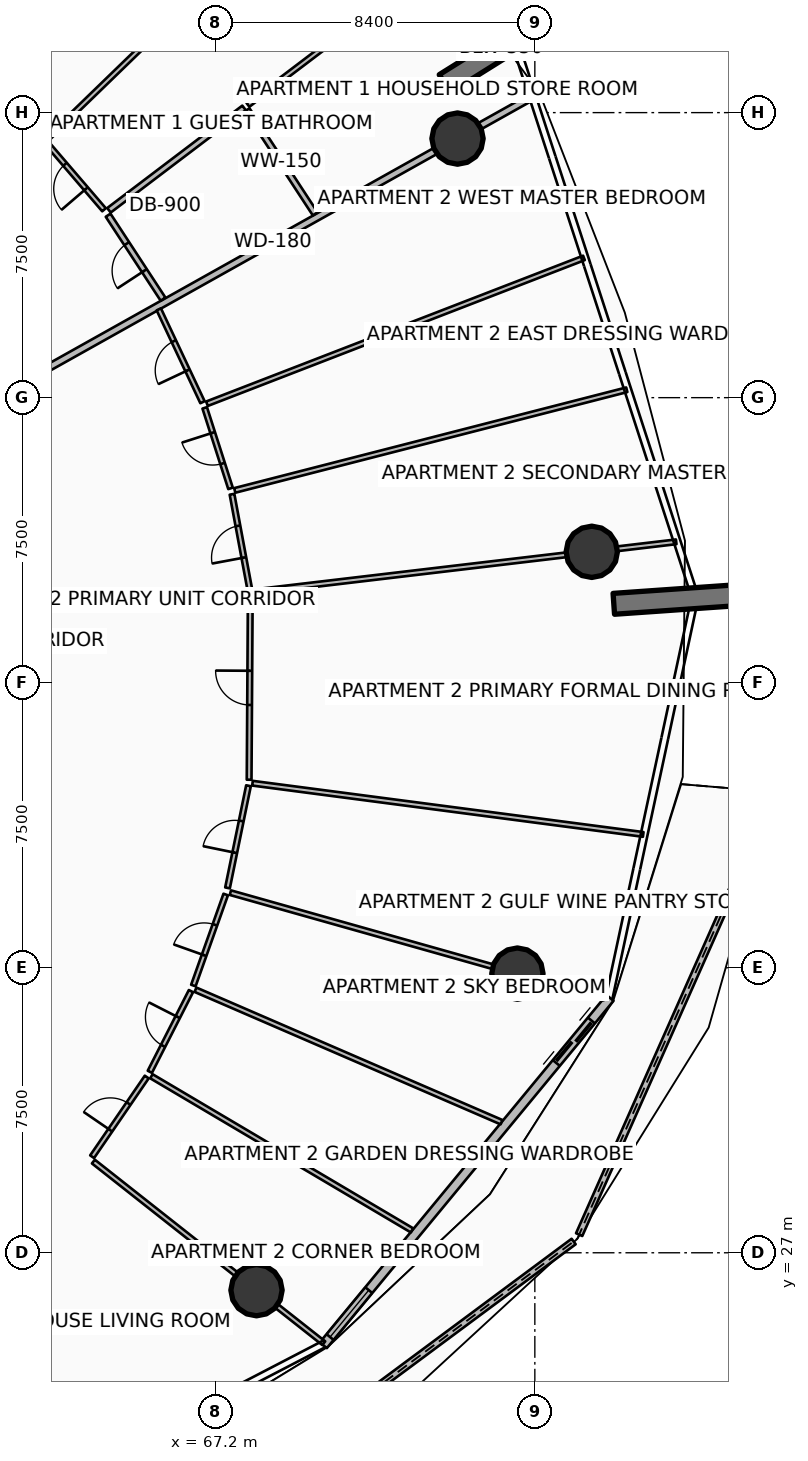
"""IFC4 building model, lengths in metres.
Left out: names, types, materials, properties, quantities, classifications, styles, units other than length and angle.
Written with IfcOpenShell. Run it as: python <this file> out.ifc"""

import sys

from ifc_helpers import new_model, si_unit, direction, frame, frame_2d, origin, origin_2d, place, context, subcontext, project, spatial, polyline, rectangle, circle, outline, extrude, element, fill, save


model = new_model("IFC4")
c1 = context("Model", 3, precision=1e-05, world=origin(), true_north=direction((0.0, 1.0)))
c2 = subcontext(c1, "Body", "Model", "MODEL_VIEW")
j1 = project(units=[si_unit("LENGTHUNIT", "METRE"), si_unit("PLANEANGLEUNIT", "RADIAN")], contexts=[c1])
p1 = place(None, origin())
s1 = spatial("IfcSite", under=j1, at=p1, CompositionType="ELEMENT")
p2 = place(p1, origin())
s2 = spatial("IfcBuilding", under=s1, at=p2, CompositionType="ELEMENT")
p3 = place(p2, frame((0.0, 0.0, 30.15)))
s3 = spatial("IfcBuildingStorey", under=s2, at=p3, CompositionType="ELEMENT", Elevation=30.15)
for number, where, z_axis, x_axis in (
    (1, (73.23, 57.765, 0.0), (0.0, 0.0, 1.0), (0.848, 0.53, 0.0)),
    (2, (77.678, 44.075, 0.0), (0.0, 0.0, 1.0), (0.998, 0.07, 0.0)),
):
    element("IfcWall", number, at=place(p3, frame(where, z_axis=z_axis, x_axis=x_axis)), inside=s3, PredefinedType="SOLIDWALL", context=c2, shape_type="SweptSolid", body=[
        extrude(rectangle(XDim=3.5, YDim=0.55, at=frame_2d((1.75, 0.0))), origin(), (0.0, 0.0, 1.0), 3.75),
    ])
for number, where, z_axis, x_axis in (
    (3, (73.565, 56.317, 0.0), (0.0, 0.0, 1.0), (1.0, 0.0, 0.0)),
    (4, (68.276, 26.016, 0.0), (0.0, 0.0, 1.0), (1.0, 0.0, 0.0)),
    (5, (75.141, 34.345, 0.0), (0.0, 0.0, 1.0), (1.0, 0.0, 0.0)),
    (6, (77.098, 45.444, 0.0), (0.0, 0.0, 1.0), (1.0, 0.0, 0.0)),
):
    element("IfcColumn", number, at=place(p3, frame(where, z_axis=z_axis, x_axis=x_axis)), inside=s3, PredefinedType="COLUMN", context=c2, shape_type="SweptSolid", body=[
        extrude(circle(Radius=0.675, at=origin_2d()), origin(), (0.0, 0.0, 1.0), 3.5),
    ])
p4 = place(p3, frame((66.933, 20.104, 0.0), z_axis=(0.0, 0.0, 1.0), x_axis=(0.802947764501, 0.596049400204, 0.0)))
e7 = element("IfcWall", 7, at=p4, inside=s3, PredefinedType="PARAPET", context=c2, shape_type="SweptSolid", body=[
    extrude(outline(polyline([(0.0, 0.0), (12.065, 0.0), (12.066, 1.832), (6.033, 1.696), (0.0, 1.497), (0.0, 0.0)])), frame((0.0, 0.09, 0.0), z_axis=(0.0, -1.0, 0.0), x_axis=(1.0, 0.0, 0.0)), (0.0, 0.0, 1.0), 0.18),
])
p5 = place(p3, frame((76.766, 27.477, 0.0), z_axis=(0.0, 0.0, 1.0), x_axis=(0.405953542593, 0.91389371442, 0.0)))
e8 = element("IfcWall", 8, at=p5, inside=s3, PredefinedType="PARAPET", context=c2, shape_type="SweptSolid", body=[
    extrude(outline(polyline([(0.0, 0.0), (12.74, 0.0), (12.74, 1.756), (6.37, 1.853), (0.0, 1.832), (0.0, 0.0)])), frame((0.0, 0.09, 0.0), z_axis=(0.0, -1.0, 0.0), x_axis=(1.0, 0.0, 0.0)), (0.0, 0.0, 1.0), 0.18),
])
p6 = place(p3, frame((70.033, 24.567, 0.0), z_axis=(0.0, 0.0, 1.0), x_axis=(0.636674332663, 0.771132799281, 0.0)))
e9 = element("IfcWall", 9, at=p6, inside=s3, PredefinedType="SOLIDWALL", context=c2, shape_type="SweptSolid", body=[
    extrude(rectangle(XDim=11.851, YDim=0.24, at=frame_2d((5.926, 0.0))), origin(), (0.0, 0.0, 1.0), 2.45),
])
p7 = place(p6, frame((9.631, 0.0, 0.0)))
e10 = element("IfcOpeningElement", 10, at=p7, cuts=e9, PredefinedType="OPENING", context=c2, shape_type="SweptSolid", body=[
    extrude(rectangle(XDim=1.45, YDim=2.15, at=frame_2d((0.725, 1.075))), frame((0.0, 0.13, 0.0), z_axis=(0.0, -1.0, 0.0), x_axis=(1.0, 0.0, 0.0)), (0.0, 0.0, 1.0), 0.26),
])
p8 = place(p6, frame((0.28, 0.0, 0.65)))
e11 = element("IfcOpeningElement", 11, at=p8, cuts=e9, PredefinedType="OPENING", context=c2, shape_type="SweptSolid", body=[
    extrude(rectangle(XDim=1.6, YDim=1.5, at=frame_2d((0.8, 0.75))), frame((0.0, 0.13, 0.0), z_axis=(0.0, -1.0, 0.0), x_axis=(1.0, 0.0, 0.0)), (0.0, 0.0, 1.0), 0.26),
])
p9 = place(p3, frame((61.896, 49.782, 0.0), z_axis=(0.0, 0.0, 1.0), x_axis=(0.872493215695, 0.488626225828, 0.0)))
e12 = element("IfcWall", 12, at=p9, inside=s3, PredefinedType="PARTITIONING", context=c2, shape_type="SweptSolid", body=[
    extrude(rectangle(XDim=15.612, YDim=0.18, at=frame_2d((7.806, 0.0))), origin(), (0.0, 0.0, 1.0), 2.867),
])
p10 = place(p3, frame((65.816, 52.092, 0.0), z_axis=(0.0, 0.0, 1.0), x_axis=(-0.547635625156, 0.836716930664, 0.0)))
e13 = element("IfcWall", 13, at=p10, inside=s3, PredefinedType="PARTITIONING", context=c2, shape_type="SweptSolid", body=[
    extrude(rectangle(XDim=2.639, YDim=0.15, at=frame_2d((1.32, 0.0))), origin(), (0.0, 0.0, 1.0), 2.867),
])
p11 = place(p10, frame((0.895, 0.0, 0.0)))
e14 = element("IfcOpeningElement", 14, at=p11, cuts=e13, PredefinedType="OPENING", context=c2, shape_type="SweptSolid", body=[
    extrude(rectangle(XDim=0.85, YDim=2.06, at=frame_2d((0.425, 1.03))), frame((0.0, 0.085, 0.0), z_axis=(0.0, -1.0, 0.0), x_axis=(1.0, 0.0, 0.0)), (0.0, 0.0, 1.0), 0.17),
])
p12 = place(p3, frame((69.821, 54.335, 0.0), z_axis=(0.0, 0.0, 1.0), x_axis=(-0.547709492592, 0.836668579382, 0.0)))
e15 = element("IfcWall", 15, at=p12, inside=s3, PredefinedType="PARTITIONING", context=c2, shape_type="SweptSolid", body=[
    extrude(rectangle(XDim=3.273, YDim=0.15, at=frame_2d((1.637, 0.0))), origin(), (0.0, 0.0, 1.0), 2.867),
])
p13 = place(p3, frame((64.394, 54.43, 0.0), z_axis=(0.0, 0.0, 1.0), x_axis=(0.796855751732, 0.604169604442, 0.0)))
e16 = element("IfcWall", 16, at=p13, inside=s3, PredefinedType="PARTITIONING", context=c2, shape_type="SweptSolid", body=[
    extrude(rectangle(XDim=4.46, YDim=0.15, at=frame_2d((2.23, 0.0))), origin(), (0.0, 0.0, 1.0), 2.94),
])
p14 = place(p3, frame((68.051, 57.203, 0.0), z_axis=(0.0, 0.0, 1.0), x_axis=(0.796847589026, 0.604180370307, 0.0)))
e17 = element("IfcWall", 17, at=p14, inside=s3, PredefinedType="PARTITIONING", context=c2, shape_type="SweptSolid", body=[
    extrude(rectangle(XDim=6.015, YDim=0.125, at=frame_2d((3.008, 0.0))), origin(), (0.0, 0.0, 1.0), 2.94),
])
p15 = place(p14, frame((2.583, 0.0, 0.0)))
e18 = element("IfcOpeningElement", 18, at=p15, cuts=e17, PredefinedType="OPENING", context=c2, shape_type="SweptSolid", body=[
    extrude(rectangle(XDim=0.85, YDim=2.06, at=frame_2d((0.425, 1.03))), frame((0.0, 0.073, 0.0), z_axis=(0.0, -1.0, 0.0), x_axis=(1.0, 0.0, 0.0)), (0.0, 0.0, 1.0), 0.145),
])
p16 = place(p3, frame((62.775, 56.316, 0.0), z_axis=(0.0, 0.0, 1.0), x_axis=(0.718182919159, 0.695854363088, 0.0)))
e19 = element("IfcWall", 19, at=p16, inside=s3, PredefinedType="PARTITIONING", context=c2, shape_type="SweptSolid", body=[
    extrude(rectangle(XDim=10.114, YDim=0.125, at=frame_2d((5.057, 0.0))), origin(), (0.0, 0.0, 1.0), 2.94),
])
p17 = place(p3, frame((64.263, 54.444, 0.0), z_axis=(0.0, 0.0, 1.0), x_axis=(-0.651227570151, 0.758882502022, 0.0)))
e20 = element("IfcWall", 20, at=p17, inside=s3, PredefinedType="PARTITIONING", context=c2, shape_type="SweptSolid", body=[
    extrude(rectangle(XDim=2.304, YDim=0.125, at=frame_2d((1.152, 0.0))), origin(), (0.0, 0.0, 1.0), 2.94),
])
p18 = place(p17, frame((0.727, 0.0, 0.0)))
e21 = element("IfcOpeningElement", 21, at=p18, cuts=e20, PredefinedType="OPENING", context=c2, shape_type="SweptSolid", body=[
    extrude(rectangle(XDim=0.85, YDim=2.06, at=frame_2d((0.425, 1.03))), frame((0.0, 0.073, 0.0), z_axis=(0.0, -1.0, 0.0), x_axis=(1.0, 0.0, 0.0)), (0.0, 0.0, 1.0), 0.145),
])
p19 = place(p3, frame((60.743, 58.164, 0.0), z_axis=(0.0, 0.0, 1.0), x_axis=(0.61907620874, 0.785330916093, 0.0)))
e22 = element("IfcWall", 22, at=p19, inside=s3, PredefinedType="PARTITIONING", context=c2, shape_type="SweptSolid", body=[
    extrude(rectangle(XDim=10.091, YDim=0.125, at=frame_2d((5.046, 0.0))), origin(), (0.0, 0.0, 1.0), 2.867),
])
p20 = place(p3, frame((63.983, 29.4, 0.0), z_axis=(0.0, 0.0, 1.0), x_axis=(0.785322984339, -0.619086270457, 0.0)))
e23 = element("IfcWall", 23, at=p20, inside=s3, PredefinedType="PARTITIONING", context=c2, shape_type="SweptSolid", body=[
    extrude(rectangle(XDim=7.719, YDim=0.125, at=frame_2d((3.86, 0.0))), origin(), (0.0, 0.0, 1.0), 2.867),
])
p21 = place(p3, frame((65.51, 31.645, 0.0), z_axis=(0.0, 0.0, 1.0), x_axis=(0.86074163886, -0.509042072065, 0.0)))
e24 = element("IfcWall", 24, at=p21, inside=s3, PredefinedType="PARTITIONING", context=c2, shape_type="SweptSolid", body=[
    extrude(rectangle(XDim=7.968, YDim=0.125, at=frame_2d((3.984, 0.0))), origin(), (0.0, 0.0, 1.0), 2.94),
])
p22 = place(p3, frame((66.67, 33.921, 0.0), z_axis=(0.0, 0.0, 1.0), x_axis=(0.917747697885, -0.397163899451, 0.0)))
e25 = element("IfcWall", 25, at=p22, inside=s3, PredefinedType="PARTITIONING", context=c2, shape_type="SweptSolid", body=[
    extrude(rectangle(XDim=8.775, YDim=0.125, at=frame_2d((4.387, 0.0))), origin(), (0.0, 0.0, 1.0), 2.94),
])
p23 = place(p3, frame((63.95, 29.528, 0.0), z_axis=(0.0, 0.0, 1.0), x_axis=(0.565358509176, 0.824845292223, 0.0)))
e26 = element("IfcWall", 26, at=p23, inside=s3, PredefinedType="PARTITIONING", context=c2, shape_type="SweptSolid", body=[
    extrude(rectangle(XDim=2.542, YDim=0.125, at=frame_2d((1.271, 0.0))), origin(), (0.0, 0.0, 1.0), 2.867),
])
p24 = place(p23, frame((0.846, 0.0, 0.0)))
e27 = element("IfcOpeningElement", 27, at=p24, cuts=e26, PredefinedType="OPENING", context=c2, shape_type="SweptSolid", body=[
    extrude(rectangle(XDim=0.85, YDim=2.06, at=frame_2d((0.425, 1.03))), frame((0.0, 0.073, 0.0), z_axis=(0.0, -1.0, 0.0), x_axis=(1.0, 0.0, 0.0)), (0.0, 0.0, 1.0), 0.145),
])
p25 = place(p3, frame((65.469, 31.762, 0.0), z_axis=(0.0, 0.0, 1.0), x_axis=(0.45400250644, 0.891000406367, 0.0)))
e28 = element("IfcWall", 28, at=p25, inside=s3, PredefinedType="PARTITIONING", context=c2, shape_type="SweptSolid", body=[
    extrude(rectangle(XDim=2.383, YDim=0.125, at=frame_2d((1.192, 0.0))), origin(), (0.0, 0.0, 1.0), 2.94),
])
p26 = place(p25, frame((0.767, 0.0, 0.0)))
e29 = element("IfcOpeningElement", 29, at=p26, cuts=e28, PredefinedType="OPENING", context=c2, shape_type="SweptSolid", body=[
    extrude(rectangle(XDim=0.85, YDim=2.06, at=frame_2d((0.425, 1.03))), frame((0.0, 0.073, 0.0), z_axis=(0.0, -1.0, 0.0), x_axis=(1.0, 0.0, 0.0)), (0.0, 0.0, 1.0), 0.145),
])
p27 = place(p3, frame((66.614, 34.032, 0.0), z_axis=(0.0, 0.0, 1.0), x_axis=(0.335094930465, 0.942184370268, 0.0)))
e30 = element("IfcWall", 30, at=p27, inside=s3, PredefinedType="PARTITIONING", context=c2, shape_type="SweptSolid", body=[
    extrude(rectangle(XDim=2.542, YDim=0.125, at=frame_2d((1.271, 0.0))), origin(), (0.0, 0.0, 1.0), 2.867),
])
p28 = place(p27, frame((0.846, 0.0, 0.0)))
e31 = element("IfcOpeningElement", 31, at=p28, cuts=e30, PredefinedType="OPENING", context=c2, shape_type="SweptSolid", body=[
    extrude(rectangle(XDim=0.85, YDim=2.06, at=frame_2d((0.425, 1.03))), frame((0.0, 0.073, 0.0), z_axis=(0.0, -1.0, 0.0), x_axis=(1.0, 0.0, 0.0)), (0.0, 0.0, 1.0), 0.145),
])
p29 = place(p3, frame((67.589, 36.475, 0.0), z_axis=(0.0, 0.0, 1.0), x_axis=(0.962457516126, -0.271432366627, 0.0)))
e32 = element("IfcWall", 32, at=p29, inside=s3, PredefinedType="PARTITIONING", context=c2, shape_type="SweptSolid", body=[
    extrude(rectangle(XDim=10.221, YDim=0.125, at=frame_2d((5.111, 0.0))), origin(), (0.0, 0.0, 1.0), 2.867),
])
p30 = place(p3, frame((68.17, 39.355, 0.0), z_axis=(0.0, 0.0, 1.0), x_axis=(0.991512615626, -0.130010511326, 0.0)))
e33 = element("IfcWall", 33, at=p30, inside=s3, PredefinedType="PARTITIONING", context=c2, shape_type="SweptSolid", body=[
    extrude(rectangle(XDim=10.369, YDim=0.125, at=frame_2d((5.185, 0.0))), origin(), (0.0, 0.0, 1.0), 2.94),
])
p31 = place(p3, frame((67.513, 36.601, 0.0), z_axis=(0.0, 0.0, 1.0), x_axis=(0.201246233374, 0.979540684991, 0.0)))
e34 = element("IfcWall", 34, at=p31, inside=s3, PredefinedType="PARTITIONING", context=c2, shape_type="SweptSolid", body=[
    extrude(rectangle(XDim=2.744, YDim=0.125, at=frame_2d((1.372, 0.0))), origin(), (0.0, 0.0, 1.0), 2.867),
])
p32 = place(p31, frame((0.947, 0.0, 0.0)))
e35 = element("IfcOpeningElement", 35, at=p32, cuts=e34, PredefinedType="OPENING", context=c2, shape_type="SweptSolid", body=[
    extrude(rectangle(XDim=0.85, YDim=2.06, at=frame_2d((0.425, 1.03))), frame((0.0, 0.073, 0.0), z_axis=(0.0, -1.0, 0.0), x_axis=(1.0, 0.0, 0.0)), (0.0, 0.0, 1.0), 0.145),
])
p33 = place(p3, frame((68.082, 39.447, 0.0), z_axis=(0.0, 0.0, 1.0), x_axis=(0.006313643226, 0.999980068756, 0.0)))
e36 = element("IfcWall", 36, at=p33, inside=s3, PredefinedType="PARTITIONING", context=c2, shape_type="SweptSolid", body=[
    extrude(rectangle(XDim=4.833, YDim=0.125, at=frame_2d((2.417, 0.0))), origin(), (0.0, 0.0, 1.0), 2.867),
])
p34 = place(p33, frame((1.967, 0.0, 0.0)))
e37 = element("IfcOpeningElement", 37, at=p34, cuts=e36, PredefinedType="OPENING", context=c2, shape_type="SweptSolid", body=[
    extrude(rectangle(XDim=0.9, YDim=2.08, at=frame_2d((0.45, 1.04))), frame((0.0, 0.073, 0.0), z_axis=(0.0, -1.0, 0.0), x_axis=(1.0, 0.0, 0.0)), (0.0, 0.0, 1.0), 0.145),
])
p35 = place(p3, frame((68.212, 44.392, 0.0), z_axis=(0.0, 0.0, 1.0), x_axis=(0.993068868454, 0.117533920671, 0.0)))
e38 = element("IfcWall", 38, at=p35, inside=s3, PredefinedType="PARTITIONING", context=c2, shape_type="SweptSolid", body=[
    extrude(rectangle(XDim=11.186, YDim=0.125, at=frame_2d((5.593, 0.0))), origin(), (0.0, 0.0, 1.0), 2.867),
])
p36 = place(p3, frame((67.704, 47.059, 0.0), z_axis=(0.0, 0.0, 1.0), x_axis=(0.968581650893, 0.248695769071, 0.0)))
e39 = element("IfcWall", 39, at=p36, inside=s3, PredefinedType="PARTITIONING", context=c2, shape_type="SweptSolid", body=[
    extrude(rectangle(XDim=10.65, YDim=0.125, at=frame_2d((5.325, 0.0))), origin(), (0.0, 0.0, 1.0), 2.94),
])
p37 = place(p3, frame((66.973, 49.34, 0.0), z_axis=(0.0, 0.0, 1.0), x_axis=(0.93264336061, 0.360799614621, 0.0)))
e40 = element("IfcWall", 40, at=p37, inside=s3, PredefinedType="PARTITIONING", context=c2, shape_type="SweptSolid", body=[
    extrude(rectangle(XDim=10.636, YDim=0.125, at=frame_2d((5.318, 0.0))), origin(), (0.0, 0.0, 1.0), 2.94),
])
p38 = place(p3, frame((68.098, 44.459, 0.0), z_axis=(0.0, 0.0, 1.0), x_axis=(-0.183523097457, 0.983015397997, 0.0)))
e41 = element("IfcWall", 41, at=p38, inside=s3, PredefinedType="PARTITIONING", context=c2, shape_type="SweptSolid", body=[
    extrude(rectangle(XDim=2.542, YDim=0.125, at=frame_2d((1.271, 0.0))), origin(), (0.0, 0.0, 1.0), 2.867),
])
p39 = place(p38, frame((0.846, 0.0, 0.0)))
e42 = element("IfcOpeningElement", 42, at=p39, cuts=e41, PredefinedType="OPENING", context=c2, shape_type="SweptSolid", body=[
    extrude(rectangle(XDim=0.85, YDim=2.06, at=frame_2d((0.425, 1.03))), frame((0.0, 0.073, 0.0), z_axis=(0.0, -1.0, 0.0), x_axis=(1.0, 0.0, 0.0)), (0.0, 0.0, 1.0), 0.145),
])
p40 = place(p3, frame((67.592, 47.113, 0.0), z_axis=(0.0, 0.0, 1.0), x_axis=(-0.305309270218, 0.952253248626, 0.0)))
e43 = element("IfcWall", 43, at=p40, inside=s3, PredefinedType="PARTITIONING", context=c2, shape_type="SweptSolid", body=[
    extrude(rectangle(XDim=2.225, YDim=0.125, at=frame_2d((1.112, 0.0))), origin(), (0.0, 0.0, 1.0), 2.94),
])
p41 = place(p40, frame((0.687, 0.0, 0.0)))
e44 = element("IfcOpeningElement", 44, at=p41, cuts=e43, PredefinedType="OPENING", context=c2, shape_type="SweptSolid", body=[
    extrude(rectangle(XDim=0.85, YDim=2.06, at=frame_2d((0.425, 1.03))), frame((0.0, 0.073, 0.0), z_axis=(0.0, -1.0, 0.0), x_axis=(1.0, 0.0, 0.0)), (0.0, 0.0, 1.0), 0.145),
])
p42 = place(p3, frame((66.854, 49.38, 0.0), z_axis=(0.0, 0.0, 1.0), x_axis=(-0.425714313245, 0.904857626093, 0.0)))
e45 = element("IfcWall", 45, at=p42, inside=s3, PredefinedType="PARTITIONING", context=c2, shape_type="SweptSolid", body=[
    extrude(rectangle(XDim=2.7, YDim=0.125, at=frame_2d((1.35, 0.0))), origin(), (0.0, 0.0, 1.0), 2.867),
])
p43 = place(p42, frame((0.925, 0.0, 0.0)))
e46 = element("IfcOpeningElement", 46, at=p43, cuts=e45, PredefinedType="OPENING", context=c2, shape_type="SweptSolid", body=[
    extrude(rectangle(XDim=0.85, YDim=2.06, at=frame_2d((0.425, 1.03))), frame((0.0, 0.073, 0.0), z_axis=(0.0, -1.0, 0.0), x_axis=(1.0, 0.0, 0.0)), (0.0, 0.0, 1.0), 0.145),
])
p44 = place(p7, origin())
e47 = element("IfcDoor", 47, at=p44, inside=s3, OperationType="DOUBLE_DOOR_SLIDING", PredefinedType="DOOR", context=c2, shape_type="SweptSolid", body=[
    extrude(rectangle(XDim=1.45, YDim=2.15, at=frame_2d((0.725, 1.075))), frame((0.0, 0.025, 0.0), z_axis=(0.0, -1.0, 0.0), x_axis=(1.0, 0.0, 0.0)), (0.0, 0.0, 1.0), 0.05),
])
fill(e10, e47)
p45 = place(p8, origin())
e48 = element("IfcWindow", 48, at=p45, inside=s3, PartitioningType="SINGLE_PANEL", PredefinedType="WINDOW", context=c2, shape_type="SweptSolid", body=[
    extrude(rectangle(XDim=1.6, YDim=1.5, at=frame_2d((0.8, 0.75))), frame((0.0, 0.03, 0.0), z_axis=(0.0, -1.0, 0.0), x_axis=(1.0, 0.0, 0.0)), (0.0, 0.0, 1.0), 0.06),
])
fill(e11, e48)
p46 = place(p11, origin())
e49 = element("IfcDoor", 49, at=p46, inside=s3, OperationType="SINGLE_SWING_LEFT", PredefinedType="DOOR", context=c2, shape_type="SweptSolid", body=[
    extrude(rectangle(XDim=0.85, YDim=2.06, at=frame_2d((0.425, 1.03))), frame((0.0, 0.025, 0.0), z_axis=(0.0, -1.0, 0.0), x_axis=(1.0, 0.0, 0.0)), (0.0, 0.0, 1.0), 0.05),
])
fill(e14, e49)
p47 = place(p18, origin())
e50 = element("IfcDoor", 50, at=p47, inside=s3, OperationType="SINGLE_SWING_LEFT", PredefinedType="DOOR", context=c2, shape_type="SweptSolid", body=[
    extrude(rectangle(XDim=0.85, YDim=2.06, at=frame_2d((0.425, 1.03))), frame((0.0, 0.025, 0.0), z_axis=(0.0, -1.0, 0.0), x_axis=(1.0, 0.0, 0.0)), (0.0, 0.0, 1.0), 0.05),
])
fill(e21, e50)
p48 = place(p24, origin())
e51 = element("IfcDoor", 51, at=p48, inside=s3, OperationType="SINGLE_SWING_LEFT", PredefinedType="DOOR", context=c2, shape_type="SweptSolid", body=[
    extrude(rectangle(XDim=0.85, YDim=2.06, at=frame_2d((0.425, 1.03))), frame((0.0, 0.025, 0.0), z_axis=(0.0, -1.0, 0.0), x_axis=(1.0, 0.0, 0.0)), (0.0, 0.0, 1.0), 0.05),
])
fill(e27, e51)
p49 = place(p26, origin())
e52 = element("IfcDoor", 52, at=p49, inside=s3, OperationType="SINGLE_SWING_RIGHT", PredefinedType="DOOR", context=c2, shape_type="SweptSolid", body=[
    extrude(rectangle(XDim=0.85, YDim=2.06, at=frame_2d((0.425, 1.03))), frame((0.0, 0.025, 0.0), z_axis=(0.0, -1.0, 0.0), x_axis=(1.0, 0.0, 0.0)), (0.0, 0.0, 1.0), 0.05),
])
fill(e29, e52)
p50 = place(p28, origin())
e53 = element("IfcDoor", 53, at=p50, inside=s3, OperationType="SINGLE_SWING_LEFT", PredefinedType="DOOR", context=c2, shape_type="SweptSolid", body=[
    extrude(rectangle(XDim=0.85, YDim=2.06, at=frame_2d((0.425, 1.03))), frame((0.0, 0.025, 0.0), z_axis=(0.0, -1.0, 0.0), x_axis=(1.0, 0.0, 0.0)), (0.0, 0.0, 1.0), 0.05),
])
fill(e31, e53)
p51 = place(p32, origin())
e54 = element("IfcDoor", 54, at=p51, inside=s3, OperationType="SINGLE_SWING_LEFT", PredefinedType="DOOR", context=c2, shape_type="SweptSolid", body=[
    extrude(rectangle(XDim=0.85, YDim=2.06, at=frame_2d((0.425, 1.03))), frame((0.0, 0.025, 0.0), z_axis=(0.0, -1.0, 0.0), x_axis=(1.0, 0.0, 0.0)), (0.0, 0.0, 1.0), 0.05),
])
fill(e35, e54)
p52 = place(p34, origin())
e55 = element("IfcDoor", 55, at=p52, inside=s3, OperationType="SINGLE_SWING_RIGHT", PredefinedType="DOOR", context=c2, shape_type="SweptSolid", body=[
    extrude(rectangle(XDim=0.9, YDim=2.08, at=frame_2d((0.45, 1.04))), frame((0.0, 0.025, 0.0), z_axis=(0.0, -1.0, 0.0), x_axis=(1.0, 0.0, 0.0)), (0.0, 0.0, 1.0), 0.05),
])
fill(e37, e55)
p53 = place(p39, origin())
e56 = element("IfcDoor", 56, at=p53, inside=s3, OperationType="SINGLE_SWING_LEFT", PredefinedType="DOOR", context=c2, shape_type="SweptSolid", body=[
    extrude(rectangle(XDim=0.85, YDim=2.06, at=frame_2d((0.425, 1.03))), frame((0.0, 0.025, 0.0), z_axis=(0.0, -1.0, 0.0), x_axis=(1.0, 0.0, 0.0)), (0.0, 0.0, 1.0), 0.05),
])
fill(e42, e56)
p54 = place(p41, origin())
e57 = element("IfcDoor", 57, at=p54, inside=s3, OperationType="SINGLE_SWING_RIGHT", PredefinedType="DOOR", context=c2, shape_type="SweptSolid", body=[
    extrude(rectangle(XDim=0.85, YDim=2.06, at=frame_2d((0.425, 1.03))), frame((0.0, 0.025, 0.0), z_axis=(0.0, -1.0, 0.0), x_axis=(1.0, 0.0, 0.0)), (0.0, 0.0, 1.0), 0.05),
])
fill(e44, e57)
p55 = place(p43, origin())
e58 = element("IfcDoor", 58, at=p55, inside=s3, OperationType="SINGLE_SWING_LEFT", PredefinedType="DOOR", context=c2, shape_type="SweptSolid", body=[
    extrude(rectangle(XDim=0.85, YDim=2.06, at=frame_2d((0.425, 1.03))), frame((0.0, 0.025, 0.0), z_axis=(0.0, -1.0, 0.0), x_axis=(1.0, 0.0, 0.0)), (0.0, 0.0, 1.0), 0.05),
])
fill(e46, e58)
save(model, sys.argv[1])
